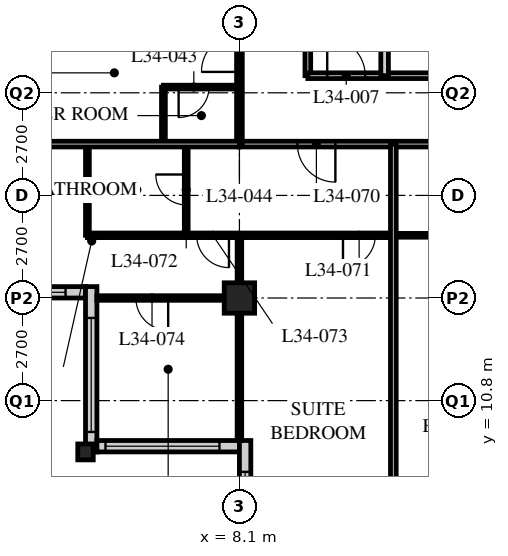
"""IFC4 building model, lengths in metres.
Left out: names, types, materials, properties, quantities, classifications, styles, units other than length and angle.
Written with IfcOpenShell. Run it as: python <this file> out.ifc"""

import sys

from ifc_helpers import new_model, si_unit, direction, frame, frame_2d, origin, origin_2d, place, context, subcontext, project, spatial, rectangle, hollow_rectangle, i_section, extrude, element, fill, save


model = new_model("IFC4")
c1 = context("Model", 3, precision=1e-05, world=origin(), true_north=direction((0.0, 1.0)))
c2 = subcontext(c1, "Body", "Model", "MODEL_VIEW")
j1 = project(units=[si_unit("LENGTHUNIT", "METRE"), si_unit("PLANEANGLEUNIT", "RADIAN")], contexts=[c1])
p1 = place(None, origin())
s1 = spatial("IfcSite", under=j1, at=p1, CompositionType="ELEMENT")
p2 = place(p1, origin())
s2 = spatial("IfcBuilding", under=s1, at=p2, CompositionType="ELEMENT")
p3 = place(p2, frame((0.0, 0.0, 134.0)))
s3 = spatial("IfcBuildingStorey", under=s2, at=p3, CompositionType="ELEMENT", Elevation=134.0)
p4 = place(p3, frame((4.05, 9.45, 0.0), z_axis=(0.0, 0.0, 1.0), x_axis=(1.0, 0.0, 0.0)))
e1 = element("IfcColumn", 1, at=p4, inside=s3, PredefinedType="COLUMN", context=c2, shape_type="SweptSolid", body=[
    extrude(i_section(OverallWidth=0.407, OverallDepth=0.419, WebThickness=0.031, FlangeThickness=0.049, FilletRadius=0.015, at=origin_2d()), origin(), (0.0, 0.0, 1.0), 3.4),
])
p5 = place(p3, frame((8.1, 13.5, 0.0), z_axis=(0.0, 0.0, 1.0), x_axis=(1.0, 0.0, 0.0)))
e2 = element("IfcColumn", 2, at=p5, inside=s3, PredefinedType="COLUMN", context=c2, shape_type="SweptSolid", body=[
    extrude(hollow_rectangle(XDim=0.8, YDim=0.8, WallThickness=0.08, at=origin_2d()), origin(), (0.0, 0.0, 1.0), 3.4),
])
p6 = place(p3, frame((0.3, 13.65, 0.0), z_axis=(0.0, 0.0, 1.0), x_axis=(1.0, 0.0, 0.0)))
e3 = element("IfcWall", 3, at=p6, inside=s3, PredefinedType="SOLIDWALL", context=c2, shape_type="SweptSolid", body=[
    extrude(rectangle(XDim=3.75, YDim=0.3, at=frame_2d((1.875, 0.0))), origin(), (0.0, 0.0, 1.0), 3.19),
])
p7 = place(p6, frame((0.225, 0.0, 0.9)))
e4 = element("IfcOpeningElement", 4, at=p7, cuts=e3, PredefinedType="OPENING", context=c2, shape_type="SweptSolid", body=[
    extrude(rectangle(XDim=3.0, YDim=1.5, at=frame_2d((1.5, 0.75))), frame((0.0, 0.16, 0.0), z_axis=(0.0, -1.0, 0.0), x_axis=(1.0, 0.0, 0.0)), (0.0, 0.0, 1.0), 0.32),
])
p8 = place(p3, frame((4.2, 13.8, 0.0), z_axis=(0.0, 0.0, 1.0), x_axis=(0.0, -1.0, 0.0)))
e5 = element("IfcWall", 5, at=p8, inside=s3, PredefinedType="SOLIDWALL", context=c2, shape_type="SweptSolid", body=[
    extrude(rectangle(XDim=4.35, YDim=0.3, at=frame_2d((2.175, 0.0))), origin(), (0.0, 0.0, 1.0), 3.19),
])
p9 = place(p8, frame((0.825, 0.0, 0.9)))
e6 = element("IfcOpeningElement", 6, at=p9, cuts=e5, PredefinedType="OPENING", context=c2, shape_type="SweptSolid", body=[
    extrude(rectangle(XDim=3.0, YDim=1.5, at=frame_2d((1.5, 0.75))), frame((0.0, 0.16, 0.0), z_axis=(0.0, -1.0, 0.0), x_axis=(1.0, 0.0, 0.0)), (0.0, 0.0, 1.0), 0.32),
])
p10 = place(p3, frame((4.35, 9.6, 0.0), z_axis=(0.0, 0.0, 1.0), x_axis=(1.0, 0.0, 0.0)))
e7 = element("IfcWall", 7, at=p10, inside=s3, PredefinedType="SOLIDWALL", context=c2, shape_type="SweptSolid", body=[
    extrude(rectangle(XDim=3.75, YDim=0.3, at=frame_2d((1.875, 0.0))), origin(), (0.0, 0.0, 1.0), 3.19),
])
p11 = place(p10, frame((0.225, 0.0, 0.9)))
e8 = element("IfcOpeningElement", 8, at=p11, cuts=e7, PredefinedType="OPENING", context=c2, shape_type="SweptSolid", body=[
    extrude(rectangle(XDim=3.0, YDim=1.5, at=frame_2d((1.5, 0.75))), frame((0.0, 0.16, 0.0), z_axis=(0.0, -1.0, 0.0), x_axis=(1.0, 0.0, 0.0)), (0.0, 0.0, 1.0), 0.32),
])
p12 = place(p3, frame((8.25, 9.75, 0.0), z_axis=(0.0, 0.0, 1.0), x_axis=(0.0, -1.0, 0.0)))
e9 = element("IfcWall", 9, at=p12, inside=s3, PredefinedType="SOLIDWALL", context=c2, shape_type="SweptSolid", body=[
    extrude(rectangle(XDim=4.35, YDim=0.3, at=frame_2d((2.175, 0.0))), origin(), (0.0, 0.0, 1.0), 3.19),
])
p13 = place(p12, frame((0.825, 0.0, 0.9)))
e10 = element("IfcOpeningElement", 10, at=p13, cuts=e9, PredefinedType="OPENING", context=c2, shape_type="SweptSolid", body=[
    extrude(rectangle(XDim=3.0, YDim=1.5, at=frame_2d((1.5, 0.75))), frame((0.0, 0.16, 0.0), z_axis=(0.0, -1.0, 0.0), x_axis=(1.0, 0.0, 0.0)), (0.0, 0.0, 1.0), 0.32),
])
p14 = place(p3, frame((8.1, 17.55, 0.0), z_axis=(0.0, 0.0, 1.0), x_axis=(1.0, 0.0, 0.0)))
e11 = element("IfcWall", 11, at=p14, inside=s3, PredefinedType="PARTITIONING", context=c2, shape_type="SweptSolid", body=[
    extrude(rectangle(XDim=36.45, YDim=0.15, at=frame_2d((18.225, 0.0))), origin(), (0.0, 0.0, 1.0), 3.19),
])
p15 = place(p14, frame((9.625, 0.0, 0.0)))
e12 = element("IfcOpeningElement", 12, at=p15, cuts=e11, PredefinedType="OPENING", context=c2, shape_type="SweptSolid", body=[
    extrude(rectangle(XDim=1.0, YDim=2.1, at=frame_2d((0.5, 1.05))), frame((0.0, 0.085, 0.0), z_axis=(0.0, -1.0, 0.0), x_axis=(1.0, 0.0, 0.0)), (0.0, 0.0, 1.0), 0.17),
])
p16 = place(p14, frame((18.1, 0.0, 0.0)))
e13 = element("IfcOpeningElement", 13, at=p16, cuts=e11, PredefinedType="OPENING", context=c2, shape_type="SweptSolid", body=[
    extrude(rectangle(XDim=1.0, YDim=2.1, at=frame_2d((0.5, 1.05))), frame((0.0, 0.085, 0.0), z_axis=(0.0, -1.0, 0.0), x_axis=(1.0, 0.0, 0.0)), (0.0, 0.0, 1.0), 0.17),
])
p17 = place(p14, frame((26.75, 0.0, 0.0)))
e14 = element("IfcOpeningElement", 14, at=p17, cuts=e11, PredefinedType="OPENING", context=c2, shape_type="SweptSolid", body=[
    extrude(rectangle(XDim=1.0, YDim=2.1, at=frame_2d((0.5, 1.05))), frame((0.0, 0.085, 0.0), z_axis=(0.0, -1.0, 0.0), x_axis=(1.0, 0.0, 0.0)), (0.0, 0.0, 1.0), 0.17),
])
p18 = place(p14, frame((30.8, 0.0, 0.0)))
e15 = element("IfcOpeningElement", 15, at=p18, cuts=e11, PredefinedType="OPENING", context=c2, shape_type="SweptSolid", body=[
    extrude(rectangle(XDim=1.0, YDim=2.1, at=frame_2d((0.5, 1.05))), frame((0.0, 0.085, 0.0), z_axis=(0.0, -1.0, 0.0), x_axis=(1.0, 0.0, 0.0)), (0.0, 0.0, 1.0), 0.17),
])
p19 = place(p14, frame((1.525, 0.0, 0.0)))
e16 = element("IfcOpeningElement", 16, at=p19, cuts=e11, PredefinedType="OPENING", context=c2, shape_type="SweptSolid", body=[
    extrude(rectangle(XDim=1.0, YDim=2.1, at=frame_2d((0.5, 1.05))), frame((0.0, 0.085, 0.0), z_axis=(0.0, -1.0, 0.0), x_axis=(1.0, 0.0, 0.0)), (0.0, 0.0, 1.0), 0.17),
])
p20 = place(p14, frame((33.925, 0.0, 0.0)))
e17 = element("IfcOpeningElement", 17, at=p20, cuts=e11, PredefinedType="OPENING", context=c2, shape_type="SweptSolid", body=[
    extrude(rectangle(XDim=1.0, YDim=2.1, at=frame_2d((0.5, 1.05))), frame((0.0, 0.085, 0.0), z_axis=(0.0, -1.0, 0.0), x_axis=(1.0, 0.0, 0.0)), (0.0, 0.0, 1.0), 0.17),
])
p21 = place(p3, frame((8.1, 17.55, 0.0), z_axis=(0.0, 0.0, 1.0), x_axis=(0.0, 1.0, 0.0)))
e18 = element("IfcWall", 18, at=p21, inside=s3, PredefinedType="PARTITIONING", context=c2, shape_type="SweptSolid", body=[
    extrude(rectangle(XDim=28.35, YDim=0.15, at=frame_2d((14.175, 0.0))), origin(), (0.0, 0.0, 1.0), 2.578),
])
p22 = place(p21, frame((1.9, 0.0, 0.0)))
e19 = element("IfcOpeningElement", 19, at=p22, cuts=e18, PredefinedType="OPENING", context=c2, shape_type="SweptSolid", body=[
    extrude(rectangle(XDim=1.0, YDim=2.1, at=frame_2d((0.5, 1.05))), frame((0.0, 0.085, 0.0), z_axis=(0.0, -1.0, 0.0), x_axis=(1.0, 0.0, 0.0)), (0.0, 0.0, 1.0), 0.17),
])
p23 = place(p21, frame((10.0, 0.0, 0.0)))
e20 = element("IfcOpeningElement", 20, at=p23, cuts=e18, PredefinedType="OPENING", context=c2, shape_type="SweptSolid", body=[
    extrude(rectangle(XDim=1.0, YDim=2.1, at=frame_2d((0.5, 1.05))), frame((0.0, 0.085, 0.0), z_axis=(0.0, -1.0, 0.0), x_axis=(1.0, 0.0, 0.0)), (0.0, 0.0, 1.0), 0.17),
])
p24 = place(p21, frame((18.1, 0.0, 0.0)))
e21 = element("IfcOpeningElement", 21, at=p24, cuts=e18, PredefinedType="OPENING", context=c2, shape_type="SweptSolid", body=[
    extrude(rectangle(XDim=1.0, YDim=2.1, at=frame_2d((0.5, 1.05))), frame((0.0, 0.085, 0.0), z_axis=(0.0, -1.0, 0.0), x_axis=(1.0, 0.0, 0.0)), (0.0, 0.0, 1.0), 0.17),
])
p25 = place(p21, frame((24.9, 0.0, 0.0)))
e22 = element("IfcOpeningElement", 22, at=p25, cuts=e18, PredefinedType="OPENING", context=c2, shape_type="SweptSolid", body=[
    extrude(rectangle(XDim=1.0, YDim=2.1, at=frame_2d((0.5, 1.05))), frame((0.0, 0.085, 0.0), z_axis=(0.0, -1.0, 0.0), x_axis=(1.0, 0.0, 0.0)), (0.0, 0.0, 1.0), 0.17),
])
p26 = place(p3, frame((9.9, 44.1, 0.0), z_axis=(0.0, 0.0, 1.0), x_axis=(0.0, -1.0, 0.0)))
e23 = element("IfcWall", 23, at=p26, inside=s3, PredefinedType="PARTITIONING", context=c2, shape_type="SweptSolid", body=[
    extrude(rectangle(XDim=24.75, YDim=0.15, at=frame_2d((12.375, 0.0))), origin(), (0.0, 0.0, 1.0), 3.19),
])
p27 = place(p26, frame((17.871, 0.0, 0.0)))
e24 = element("IfcOpeningElement", 24, at=p27, cuts=e23, PredefinedType="OPENING", context=c2, shape_type="SweptSolid", body=[
    extrude(rectangle(XDim=1.0, YDim=2.1, at=frame_2d((0.5, 1.05))), frame((0.0, 0.085, 0.0), z_axis=(0.0, -1.0, 0.0), x_axis=(1.0, 0.0, 0.0)), (0.0, 0.0, 1.0), 0.17),
])
p28 = place(p26, frame((13.821, 0.0, 0.0)))
e25 = element("IfcOpeningElement", 25, at=p28, cuts=e23, PredefinedType="OPENING", context=c2, shape_type="SweptSolid", body=[
    extrude(rectangle(XDim=1.0, YDim=2.1, at=frame_2d((0.5, 1.05))), frame((0.0, 0.085, 0.0), z_axis=(0.0, -1.0, 0.0), x_axis=(1.0, 0.0, 0.0)), (0.0, 0.0, 1.0), 0.17),
])
p29 = place(p26, frame((10.4, 0.0, 0.0)))
e26 = element("IfcOpeningElement", 26, at=p29, cuts=e23, PredefinedType="OPENING", context=c2, shape_type="SweptSolid", body=[
    extrude(rectangle(XDim=1.0, YDim=2.1, at=frame_2d((0.5, 1.05))), frame((0.0, 0.085, 0.0), z_axis=(0.0, -1.0, 0.0), x_axis=(1.0, 0.0, 0.0)), (0.0, 0.0, 1.0), 0.17),
])
p30 = place(p26, frame((6.35, 0.0, 0.0)))
e27 = element("IfcOpeningElement", 27, at=p30, cuts=e23, PredefinedType="OPENING", context=c2, shape_type="SweptSolid", body=[
    extrude(rectangle(XDim=1.0, YDim=2.1, at=frame_2d((0.5, 1.05))), frame((0.0, 0.085, 0.0), z_axis=(0.0, -1.0, 0.0), x_axis=(1.0, 0.0, 0.0)), (0.0, 0.0, 1.0), 0.17),
])
p31 = place(p3, frame((9.9, 19.35, 0.0), z_axis=(0.0, 0.0, 1.0), x_axis=(1.0, 0.0, 0.0)))
e28 = element("IfcWall", 28, at=p31, inside=s3, PredefinedType="PARTITIONING", context=c2, shape_type="SweptSolid", body=[
    extrude(rectangle(XDim=17.24, YDim=0.15, at=frame_2d((8.62, 0.0))), origin(), (0.0, 0.0, 1.0), 3.19),
])
p32 = place(p31, frame((0.51, 0.0, 0.0)))
e29 = element("IfcOpeningElement", 29, at=p32, cuts=e28, PredefinedType="OPENING", context=c2, shape_type="SweptSolid", body=[
    extrude(rectangle(XDim=1.0, YDim=2.1, at=frame_2d((0.5, 1.05))), frame((0.0, 0.085, 0.0), z_axis=(0.0, -1.0, 0.0), x_axis=(1.0, 0.0, 0.0)), (0.0, 0.0, 1.0), 0.17),
])
p33 = place(p31, frame((3.66, 0.0, 0.0)))
e30 = element("IfcOpeningElement", 30, at=p33, cuts=e28, PredefinedType="OPENING", context=c2, shape_type="SweptSolid", body=[
    extrude(rectangle(XDim=1.0, YDim=2.1, at=frame_2d((0.5, 1.05))), frame((0.0, 0.085, 0.0), z_axis=(0.0, -1.0, 0.0), x_axis=(1.0, 0.0, 0.0)), (0.0, 0.0, 1.0), 0.17),
])
p34 = place(p31, frame((7.618, 0.0, 0.0)))
e31 = element("IfcOpeningElement", 31, at=p34, cuts=e28, PredefinedType="OPENING", context=c2, shape_type="SweptSolid", body=[
    extrude(rectangle(XDim=1.0, YDim=2.1, at=frame_2d((0.5, 1.05))), frame((0.0, 0.085, 0.0), z_axis=(0.0, -1.0, 0.0), x_axis=(1.0, 0.0, 0.0)), (0.0, 0.0, 1.0), 0.17),
])
p35 = place(p31, frame((13.093, 0.0, 0.0)))
e32 = element("IfcOpeningElement", 32, at=p35, cuts=e28, PredefinedType="OPENING", context=c2, shape_type="SweptSolid", body=[
    extrude(rectangle(XDim=1.0, YDim=2.1, at=frame_2d((0.5, 1.05))), frame((0.0, 0.085, 0.0), z_axis=(0.0, -1.0, 0.0), x_axis=(1.0, 0.0, 0.0)), (0.0, 0.0, 1.0), 0.17),
])
p36 = place(p3, frame((11.92, 19.35, 0.0), z_axis=(0.0, 0.0, 1.0), x_axis=(0.0, 1.0, 0.0)))
e33 = element("IfcWall", 33, at=p36, inside=s3, PredefinedType="SOLIDWALL", context=c2, shape_type="SweptSolid", body=[
    extrude(rectangle(XDim=4.95, YDim=0.2, at=frame_2d((2.475, 0.0))), origin(), (0.0, 0.0, 1.0), 3.19),
])
p37 = place(p3, frame((12.15, 15.15, 0.0), z_axis=(0.0, 0.0, 1.0), x_axis=(1.0, 0.0, 0.0)))
e34 = element("IfcWall", 34, at=p37, inside=s3, PredefinedType="PARTITIONING", context=c2, shape_type="SweptSolid", body=[
    extrude(rectangle(XDim=2.6, YDim=0.1, at=frame_2d((1.3, 0.0))), origin(), (0.0, 0.0, 1.0), 3.19),
])
p38 = place(p3, frame((6.1, 17.55, 0.0), z_axis=(0.0, 0.0, 1.0), x_axis=(0.0, 1.0, 0.0)))
e35 = element("IfcWall", 35, at=p38, inside=s3, PredefinedType="PARTITIONING", context=c2, shape_type="SweptSolid", body=[
    extrude(rectangle(XDim=1.5, YDim=0.1, at=frame_2d((0.75, 0.0))), origin(), (0.0, 0.0, 1.0), 3.19),
])
p39 = place(p3, frame((8.1, 19.05, 0.0), z_axis=(0.0, 0.0, 1.0), x_axis=(-1.0, 0.0, 0.0)))
e36 = element("IfcWall", 36, at=p39, inside=s3, PredefinedType="PARTITIONING", context=c2, shape_type="SweptSolid", body=[
    extrude(rectangle(XDim=2.0, YDim=0.1, at=frame_2d((1.0, 0.0))), origin(), (0.0, 0.0, 1.0), 3.19),
])
p40 = place(p39, frame((0.8, 0.0, 0.0)))
e37 = element("IfcOpeningElement", 37, at=p40, cuts=e36, PredefinedType="OPENING", context=c2, shape_type="SweptSolid", body=[
    extrude(rectangle(XDim=0.8, YDim=2.1, at=frame_2d((0.4, 1.05))), frame((0.0, 0.06, 0.0), z_axis=(0.0, -1.0, 0.0), x_axis=(1.0, 0.0, 0.0)), (0.0, 0.0, 1.0), 0.12),
])
p41 = place(p3, frame((6.7, 17.55, 0.0), z_axis=(0.0, 0.0, 1.0), x_axis=(0.0, -1.0, 0.0)))
e38 = element("IfcWall", 38, at=p41, inside=s3, PredefinedType="PARTITIONING", context=c2, shape_type="SweptSolid", body=[
    extrude(rectangle(XDim=2.4, YDim=0.1, at=frame_2d((1.2, 0.0))), origin(), (0.0, 0.0, 1.0), 3.19),
])
p42 = place(p41, frame((0.8, 0.0, 0.0)))
e39 = element("IfcOpeningElement", 39, at=p42, cuts=e38, PredefinedType="OPENING", context=c2, shape_type="SweptSolid", body=[
    extrude(rectangle(XDim=0.8, YDim=2.1, at=frame_2d((0.4, 1.05))), frame((0.0, 0.06, 0.0), z_axis=(0.0, -1.0, 0.0), x_axis=(1.0, 0.0, 0.0)), (0.0, 0.0, 1.0), 0.12),
])
p43 = place(p3, frame((4.1, 17.55, 0.0), z_axis=(0.0, 0.0, 1.0), x_axis=(0.0, -1.0, 0.0)))
e40 = element("IfcWall", 40, at=p43, inside=s3, PredefinedType="PARTITIONING", context=c2, shape_type="SweptSolid", body=[
    extrude(rectangle(XDim=2.4, YDim=0.1, at=frame_2d((1.2, 0.0))), origin(), (0.0, 0.0, 1.0), 3.19),
])
p44 = place(p3, frame((4.1, 15.15, 0.0), z_axis=(0.0, 0.0, 1.0), x_axis=(1.0, 0.0, 0.0)))
e41 = element("IfcWall", 41, at=p44, inside=s3, PredefinedType="PARTITIONING", context=c2, shape_type="SweptSolid", body=[
    extrude(rectangle(XDim=8.05, YDim=0.12, at=frame_2d((4.025, 0.0))), origin(), (0.0, 0.0, 1.0), 3.19),
])
p45 = place(p44, frame((6.725, 0.0, 0.0)))
e42 = element("IfcOpeningElement", 42, at=p45, cuts=e41, PredefinedType="OPENING", context=c2, shape_type="SweptSolid", body=[
    extrude(rectangle(XDim=0.85, YDim=2.1, at=frame_2d((0.425, 1.05))), frame((0.0, 0.07, 0.0), z_axis=(0.0, -1.0, 0.0), x_axis=(1.0, 0.0, 0.0)), (0.0, 0.0, 1.0), 0.14),
])
p46 = place(p44, frame((2.875, 0.0, 0.0)))
e43 = element("IfcOpeningElement", 43, at=p46, cuts=e41, PredefinedType="OPENING", context=c2, shape_type="SweptSolid", body=[
    extrude(rectangle(XDim=0.85, YDim=2.1, at=frame_2d((0.425, 1.05))), frame((0.0, 0.07, 0.0), z_axis=(0.0, -1.0, 0.0), x_axis=(1.0, 0.0, 0.0)), (0.0, 0.0, 1.0), 0.14),
])
p47 = place(p3, frame((8.1, 15.15, 0.0), z_axis=(0.0, 0.0, 1.0), x_axis=(0.0, -1.0, 0.0)))
e44 = element("IfcWall", 44, at=p47, inside=s3, PredefinedType="PARTITIONING", context=c2, shape_type="SweptSolid", body=[
    extrude(rectangle(XDim=5.4, YDim=0.12, at=frame_2d((2.7, 0.0))), origin(), (0.0, 0.0, 1.0), 2.578),
])
p48 = place(p3, frame((8.1, 13.5, 0.0), z_axis=(0.0, 0.0, 1.0), x_axis=(-1.0, 0.0, 0.0)))
e45 = element("IfcWall", 45, at=p48, inside=s3, PredefinedType="PARTITIONING", context=c2, shape_type="SweptSolid", body=[
    extrude(rectangle(XDim=3.75, YDim=0.12, at=frame_2d((1.875, 0.0))), origin(), (0.0, 0.0, 1.0), 2.578),
])
p49 = place(p48, frame((1.875, 0.0, 0.0)))
e46 = element("IfcOpeningElement", 46, at=p49, cuts=e45, PredefinedType="OPENING", context=c2, shape_type="SweptSolid", body=[
    extrude(rectangle(XDim=0.85, YDim=2.1, at=frame_2d((0.425, 1.05))), frame((0.0, 0.07, 0.0), z_axis=(0.0, -1.0, 0.0), x_axis=(1.0, 0.0, 0.0)), (0.0, 0.0, 1.0), 0.14),
])
p50 = place(p3, frame((0.3, 17.55, 0.0), z_axis=(0.0, 0.0, 1.0), x_axis=(1.0, 0.0, 0.0)))
e47 = element("IfcWall", 47, at=p50, inside=s3, PredefinedType="PARTITIONING", context=c2, shape_type="SweptSolid", body=[
    extrude(rectangle(XDim=7.8, YDim=0.15, at=frame_2d((3.9, 0.0))), origin(), (0.0, 0.0, 1.0), 3.19),
])
p51 = place(p3, frame((12.15, 17.55, 0.0), z_axis=(0.0, 0.0, 1.0), x_axis=(0.0, -1.0, 0.0)))
e48 = element("IfcWall", 48, at=p51, inside=s3, PredefinedType="PARTITIONING", context=c2, shape_type="SweptSolid", body=[
    extrude(rectangle(XDim=11.85, YDim=0.15, at=frame_2d((5.925, 0.0))), origin(), (0.0, 0.0, 1.0), 3.19),
])
p52 = place(p7, origin())
e49 = element("IfcWindow", 49, at=p52, inside=s3, PartitioningType="SINGLE_PANEL", PredefinedType="WINDOW", context=c2, shape_type="SweptSolid", body=[
    extrude(rectangle(XDim=3.0, YDim=1.5, at=frame_2d((1.5, 0.75))), frame((0.0, 0.03, 0.0), z_axis=(0.0, -1.0, 0.0), x_axis=(1.0, 0.0, 0.0)), (0.0, 0.0, 1.0), 0.06),
])
fill(e4, e49)
p53 = place(p9, origin())
e50 = element("IfcWindow", 50, at=p53, inside=s3, PartitioningType="SINGLE_PANEL", PredefinedType="WINDOW", context=c2, shape_type="SweptSolid", body=[
    extrude(rectangle(XDim=3.0, YDim=1.5, at=frame_2d((1.5, 0.75))), frame((0.0, 0.03, 0.0), z_axis=(0.0, -1.0, 0.0), x_axis=(1.0, 0.0, 0.0)), (0.0, 0.0, 1.0), 0.06),
])
fill(e6, e50)
p54 = place(p11, origin())
e51 = element("IfcWindow", 51, at=p54, inside=s3, PartitioningType="SINGLE_PANEL", PredefinedType="WINDOW", context=c2, shape_type="SweptSolid", body=[
    extrude(rectangle(XDim=3.0, YDim=1.5, at=frame_2d((1.5, 0.75))), frame((0.0, 0.03, 0.0), z_axis=(0.0, -1.0, 0.0), x_axis=(1.0, 0.0, 0.0)), (0.0, 0.0, 1.0), 0.06),
])
fill(e8, e51)
p55 = place(p13, origin())
e52 = element("IfcWindow", 52, at=p55, inside=s3, PartitioningType="SINGLE_PANEL", PredefinedType="WINDOW", context=c2, shape_type="SweptSolid", body=[
    extrude(rectangle(XDim=3.0, YDim=1.5, at=frame_2d((1.5, 0.75))), frame((0.0, 0.03, 0.0), z_axis=(0.0, -1.0, 0.0), x_axis=(1.0, 0.0, 0.0)), (0.0, 0.0, 1.0), 0.06),
])
fill(e10, e52)
p56 = place(p32, origin())
e53 = element("IfcDoor", 53, at=p56, inside=s3, OperationType="SINGLE_SWING_LEFT", PredefinedType="DOOR", context=c2, shape_type="SweptSolid", body=[
    extrude(rectangle(XDim=1.0, YDim=2.1, at=frame_2d((0.5, 1.05))), frame((0.0, 0.025, 0.0), z_axis=(0.0, -1.0, 0.0), x_axis=(1.0, 0.0, 0.0)), (0.0, 0.0, 1.0), 0.05),
])
fill(e29, e53)
p57 = place(p40, origin())
e54 = element("IfcDoor", 54, at=p57, inside=s3, OperationType="SINGLE_SWING_RIGHT", PredefinedType="DOOR", context=c2, shape_type="SweptSolid", body=[
    extrude(rectangle(XDim=0.8, YDim=2.1, at=frame_2d((0.4, 1.05))), frame((0.0, 0.025, 0.0), z_axis=(0.0, -1.0, 0.0), x_axis=(1.0, 0.0, 0.0)), (0.0, 0.0, 1.0), 0.05),
])
fill(e37, e54)
p58 = place(p22, origin())
e55 = element("IfcDoor", 55, at=p58, inside=s3, OperationType="SINGLE_SWING_LEFT", PredefinedType="DOOR", context=c2, shape_type="SweptSolid", body=[
    extrude(rectangle(XDim=1.0, YDim=2.1, at=frame_2d((0.5, 1.05))), frame((0.0, 0.025, 0.0), z_axis=(0.0, -1.0, 0.0), x_axis=(1.0, 0.0, 0.0)), (0.0, 0.0, 1.0), 0.05),
])
fill(e19, e55)
p59 = place(p19, origin())
e56 = element("IfcDoor", 56, at=p59, inside=s3, OperationType="SINGLE_SWING_LEFT", PredefinedType="DOOR", context=c2, shape_type="SweptSolid", body=[
    extrude(rectangle(XDim=1.0, YDim=2.1, at=frame_2d((0.5, 1.05))), frame((0.0, 0.025, 0.0), z_axis=(0.0, -1.0, 0.0), x_axis=(1.0, 0.0, 0.0)), (0.0, 0.0, 1.0), 0.05),
])
fill(e16, e56)
p60 = place(p45, origin())
e57 = element("IfcDoor", 57, at=p60, inside=s3, OperationType="SINGLE_SWING_RIGHT", PredefinedType="DOOR", context=c2, shape_type="SweptSolid", body=[
    extrude(rectangle(XDim=0.85, YDim=2.1, at=frame_2d((0.425, 1.05))), frame((0.0, 0.025, 0.0), z_axis=(0.0, -1.0, 0.0), x_axis=(1.0, 0.0, 0.0)), (0.0, 0.0, 1.0), 0.05),
])
fill(e42, e57)
p61 = place(p42, origin())
e58 = element("IfcDoor", 58, at=p61, inside=s3, OperationType="SINGLE_SWING_RIGHT", PredefinedType="DOOR", context=c2, shape_type="SweptSolid", body=[
    extrude(rectangle(XDim=0.8, YDim=2.1, at=frame_2d((0.4, 1.05))), frame((0.0, 0.025, 0.0), z_axis=(0.0, -1.0, 0.0), x_axis=(1.0, 0.0, 0.0)), (0.0, 0.0, 1.0), 0.05),
])
fill(e39, e58)
p62 = place(p46, origin())
e59 = element("IfcDoor", 59, at=p62, inside=s3, OperationType="SINGLE_SWING_LEFT", PredefinedType="DOOR", context=c2, shape_type="SweptSolid", body=[
    extrude(rectangle(XDim=0.85, YDim=2.1, at=frame_2d((0.425, 1.05))), frame((0.0, 0.025, 0.0), z_axis=(0.0, -1.0, 0.0), x_axis=(1.0, 0.0, 0.0)), (0.0, 0.0, 1.0), 0.05),
])
fill(e43, e59)
p63 = place(p49, origin())
e60 = element("IfcDoor", 60, at=p63, inside=s3, OperationType="SINGLE_SWING_LEFT", PredefinedType="DOOR", context=c2, shape_type="SweptSolid", body=[
    extrude(rectangle(XDim=0.85, YDim=2.1, at=frame_2d((0.425, 1.05))), frame((0.0, 0.025, 0.0), z_axis=(0.0, -1.0, 0.0), x_axis=(1.0, 0.0, 0.0)), (0.0, 0.0, 1.0), 0.05),
])
fill(e46, e60)
save(model, sys.argv[1])
